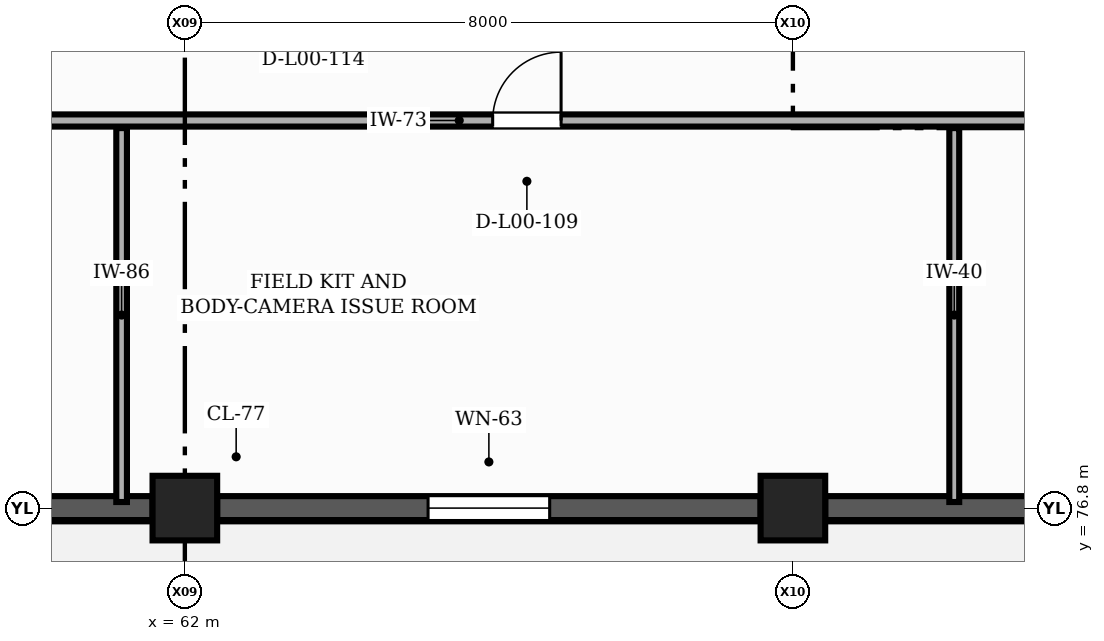
"""IFC4 building model, lengths in metres.
Left out: names, types, materials, properties, quantities, classifications, styles, units other than length and angle.
Written with IfcOpenShell. Run it as: python <this file> out.ifc"""

import sys

from ifc_helpers import new_model, si_unit, direction, frame, frame_2d, origin, origin_2d, place, context, subcontext, project, spatial, rectangle, extrude, element, fill, save


model = new_model("IFC4")
c1 = context("Model", 3, precision=1e-05, world=origin(), true_north=direction((0.0, 1.0)))
c2 = subcontext(c1, "Body", "Model", "MODEL_VIEW")
j1 = project(units=[si_unit("LENGTHUNIT", "METRE"), si_unit("PLANEANGLEUNIT", "RADIAN")], contexts=[c1])
p1 = place(None, origin())
s1 = spatial("IfcSite", under=j1, at=p1, CompositionType="ELEMENT")
p2 = place(p1, origin())
s2 = spatial("IfcBuilding", under=s1, at=p2, CompositionType="ELEMENT")
p3 = place(p2, origin())
s3 = spatial("IfcBuildingStorey", under=s2, at=p3, CompositionType="ELEMENT", Elevation=0.0)
for number, where, z_axis, x_axis in (
    (1, (62.0, 76.8, 0.0), (0.0, 0.0, 1.0), (1.0, 0.0, 0.0)),
    (2, (70.0, 76.8, 0.0), (0.0, 0.0, 1.0), (1.0, 0.0, 0.0)),
):
    element("IfcColumn", number, at=place(p3, frame(where, z_axis=z_axis, x_axis=x_axis)), inside=s3, PredefinedType="COLUMN", context=c2, shape_type="SweptSolid", body=[
        extrude(rectangle(XDim=0.85, YDim=0.85, at=origin_2d()), origin(), (0.0, 0.0, 1.0), 4.8),
    ])
p4 = place(p3, frame((54.425, 76.8, 0.0), z_axis=(0.0, 0.0, 1.0), x_axis=(1.0, 0.0, 0.0)))
e3 = element("IfcWall", 3, at=p4, inside=s3, PredefinedType="SOLIDWALL", context=c2, shape_type="SweptSolid", body=[
    extrude(rectangle(XDim=7.15, YDim=0.315, at=frame_2d((3.575, 0.0))), origin(), (0.0, 0.0, 1.0), 3.78),
])
p5 = place(p4, frame((2.775, 0.0, 0.0)))
e4 = element("IfcOpeningElement", 4, at=p5, cuts=e3, PredefinedType="OPENING", context=c2, shape_type="SweptSolid", body=[
    extrude(rectangle(XDim=1.6, YDim=2.25, at=frame_2d((0.8, 1.125))), frame((0.0, 0.167, 0.0), z_axis=(0.0, -1.0, 0.0), x_axis=(1.0, 0.0, 0.0)), (0.0, 0.0, 1.0), 0.335),
])
p6 = place(p3, frame((62.425, 76.8, 0.0), z_axis=(0.0, 0.0, 1.0), x_axis=(1.0, 0.0, 0.0)))
e5 = element("IfcWall", 5, at=p6, inside=s3, PredefinedType="SOLIDWALL", context=c2, shape_type="SweptSolid", body=[
    extrude(rectangle(XDim=7.15, YDim=0.315, at=frame_2d((3.575, 0.0))), origin(), (0.0, 0.0, 1.0), 3.78),
])
p7 = place(p6, frame((2.775, 0.0, 0.9)))
e6 = element("IfcOpeningElement", 6, at=p7, cuts=e5, PredefinedType="OPENING", context=c2, shape_type="SweptSolid", body=[
    extrude(rectangle(XDim=1.6, YDim=1.25, at=frame_2d((0.8, 0.625))), frame((0.0, 0.167, 0.0), z_axis=(0.0, -1.0, 0.0), x_axis=(1.0, 0.0, 0.0)), (0.0, 0.0, 1.0), 0.335),
])
p8 = place(p3, frame((70.425, 76.8, 0.0), z_axis=(0.0, 0.0, 1.0), x_axis=(1.0, 0.0, 0.0)))
e7 = element("IfcWall", 7, at=p8, inside=s3, PredefinedType="SOLIDWALL", context=c2, shape_type="SweptSolid", body=[
    extrude(rectangle(XDim=7.15, YDim=0.315, at=frame_2d((3.575, 0.0))), origin(), (0.0, 0.0, 1.0), 3.78),
])
p9 = place(p8, frame((2.875, 0.0, 0.9)))
e8 = element("IfcOpeningElement", 8, at=p9, cuts=e7, PredefinedType="OPENING", context=c2, shape_type="SweptSolid", body=[
    extrude(rectangle(XDim=1.4, YDim=1.4, at=frame_2d((0.7, 0.7))), frame((0.0, 0.167, 0.0), z_axis=(0.0, -1.0, 0.0), x_axis=(1.0, 0.0, 0.0)), (0.0, 0.0, 1.0), 0.335),
])
p10 = place(p3, frame((61.168, 76.88, 0.0), z_axis=(0.0, 0.0, 1.0), x_axis=(0.0, 1.0, 0.0)))
e9 = element("IfcWall", 9, at=p10, inside=s3, PredefinedType="PARTITIONING", context=c2, shape_type="SweptSolid", body=[
    extrude(rectangle(XDim=4.92, YDim=0.14, at=frame_2d((2.46, 0.0))), origin(), (0.0, 0.0, 1.0), 3.765),
])
p11 = place(p3, frame((72.123, 76.88, 0.0), z_axis=(0.0, 0.0, 1.0), x_axis=(0.0, 1.0, 0.0)))
e10 = element("IfcWall", 10, at=p11, inside=s3, PredefinedType="PARTITIONING", context=c2, shape_type="SweptSolid", body=[
    extrude(rectangle(XDim=4.92, YDim=0.13, at=frame_2d((2.46, 0.0))), origin(), (0.0, 0.0, 1.0), 3.765),
])
p12 = place(p3, frame((29.3, 81.9, 0.0), z_axis=(0.0, 0.0, 1.0), x_axis=(1.0, 0.0, 0.0)))
e11 = element("IfcWall", 11, at=p12, inside=s3, PredefinedType="PARTITIONING", context=c2, shape_type="SweptSolid", body=[
    extrude(rectangle(XDim=72.62, YDim=0.16, at=frame_2d((36.31, 0.0))), origin(), (0.0, 0.0, 1.0), 3.765),
])
p13 = place(p12, frame((7.68, 0.0, 0.0)))
e12 = element("IfcOpeningElement", 12, at=p13, cuts=e11, PredefinedType="OPENING", context=c2, shape_type="SweptSolid", body=[
    extrude(rectangle(XDim=1.08, YDim=2.14, at=frame_2d((0.54, 1.07))), frame((0.0, 0.09, 0.0), z_axis=(0.0, -1.0, 0.0), x_axis=(1.0, 0.0, 0.0)), (0.0, 0.0, 1.0), 0.18),
])
p14 = place(p12, frame((23.6, 0.0, 0.0)))
e13 = element("IfcOpeningElement", 13, at=p14, cuts=e11, PredefinedType="OPENING", context=c2, shape_type="SweptSolid", body=[
    extrude(rectangle(XDim=1.1, YDim=2.1, at=frame_2d((0.55, 1.05))), frame((0.0, 0.09, 0.0), z_axis=(0.0, -1.0, 0.0), x_axis=(1.0, 0.0, 0.0)), (0.0, 0.0, 1.0), 0.18),
])
p15 = place(p12, frame((36.75, 0.0, 0.0)))
e14 = element("IfcOpeningElement", 14, at=p15, cuts=e11, PredefinedType="OPENING", context=c2, shape_type="SweptSolid", body=[
    extrude(rectangle(XDim=0.9, YDim=2.1, at=frame_2d((0.45, 1.05))), frame((0.0, 0.09, 0.0), z_axis=(0.0, -1.0, 0.0), x_axis=(1.0, 0.0, 0.0)), (0.0, 0.0, 1.0), 0.18),
])
p16 = place(p12, frame((49.34, 0.0, 0.0)))
e15 = element("IfcOpeningElement", 15, at=p16, cuts=e11, PredefinedType="OPENING", context=c2, shape_type="SweptSolid", body=[
    extrude(rectangle(XDim=0.92, YDim=2.1, at=frame_2d((0.46, 1.05))), frame((0.0, 0.09, 0.0), z_axis=(0.0, -1.0, 0.0), x_axis=(1.0, 0.0, 0.0)), (0.0, 0.0, 1.0), 0.18),
])
p17 = place(p12, frame((64.17, 0.0, 0.0)))
e16 = element("IfcOpeningElement", 16, at=p17, cuts=e11, PredefinedType="OPENING", context=c2, shape_type="SweptSolid", body=[
    extrude(rectangle(XDim=0.95, YDim=2.1, at=frame_2d((0.475, 1.05))), frame((0.0, 0.09, 0.0), z_axis=(0.0, -1.0, 0.0), x_axis=(1.0, 0.0, 0.0)), (0.0, 0.0, 1.0), 0.18),
])
p18 = place(p7, origin())
e17 = element("IfcWindow", 17, at=p18, inside=s3, PartitioningType="SINGLE_PANEL", PredefinedType="WINDOW", context=c2, shape_type="SweptSolid", body=[
    extrude(rectangle(XDim=1.6, YDim=1.25, at=frame_2d((0.8, 0.625))), frame((0.0, 0.03, 0.0), z_axis=(0.0, -1.0, 0.0), x_axis=(1.0, 0.0, 0.0)), (0.0, 0.0, 1.0), 0.06),
])
fill(e6, e17)
p19 = place(p15, origin())
e18 = element("IfcDoor", 18, at=p19, inside=s3, OperationType="SINGLE_SWING_RIGHT", PredefinedType="DOOR", context=c2, shape_type="SweptSolid", body=[
    extrude(rectangle(XDim=0.9, YDim=2.1, at=frame_2d((0.45, 1.05))), frame((0.0, 0.025, 0.0), z_axis=(0.0, -1.0, 0.0), x_axis=(1.0, 0.0, 0.0)), (0.0, 0.0, 1.0), 0.05),
])
fill(e14, e18)
save(model, sys.argv[1])
